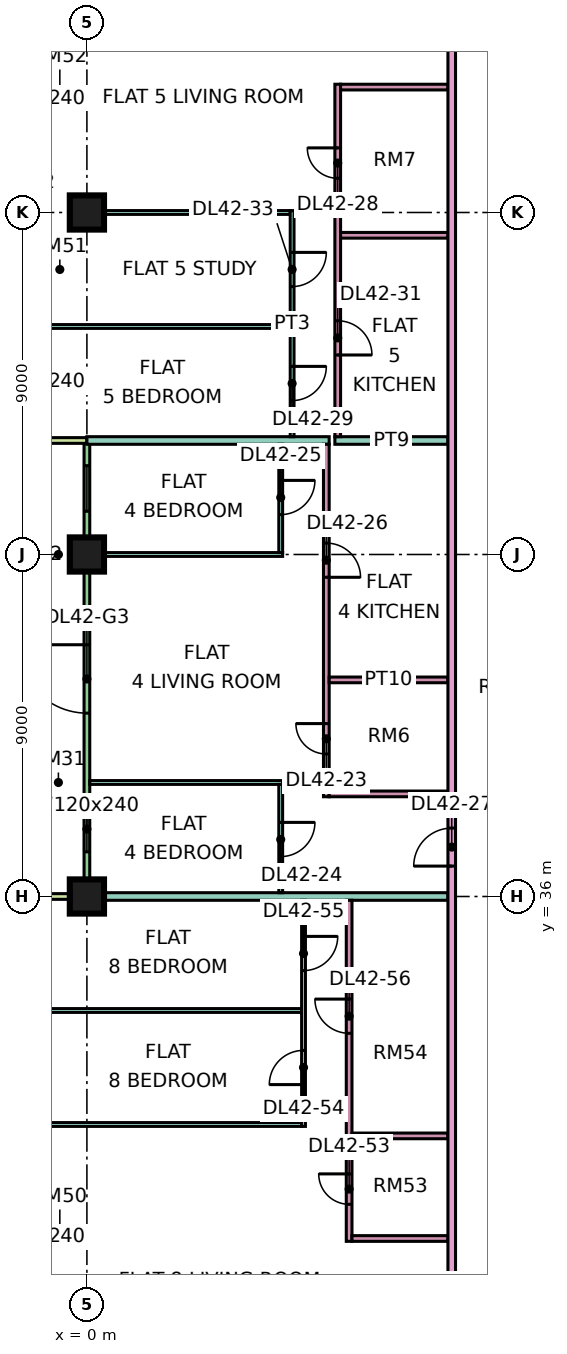
"""IFC4 building model, lengths in metres.
Left out: names, types, materials, properties, quantities, classifications, styles, units other than length and angle.
Written with IfcOpenShell. Run it as: python <this file> out.ifc"""

import sys

from ifc_helpers import new_model, si_unit, direction, frame, frame_2d, origin, origin_2d, place, context, subcontext, project, spatial, rectangle, extrude, element, fill, save


model = new_model("IFC4")
c1 = context("Model", 3, precision=1e-05, world=origin(), true_north=direction((0.0, 1.0)))
c2 = subcontext(c1, "Body", "Model", "MODEL_VIEW")
j1 = project(units=[si_unit("LENGTHUNIT", "METRE"), si_unit("PLANEANGLEUNIT", "RADIAN")], contexts=[c1])
p1 = place(None, origin())
s1 = spatial("IfcSite", under=j1, at=p1, CompositionType="ELEMENT")
p2 = place(p1, origin())
s2 = spatial("IfcBuilding", under=s1, at=p2, CompositionType="ELEMENT")
p3 = place(p2, frame((0.0, 0.0, 183.65)))
s3 = spatial("IfcBuildingStorey", under=s2, at=p3, CompositionType="ELEMENT", Elevation=183.65)
p4 = place(p3, frame((0.0, 36.0, 0.0), z_axis=(0.0, 0.0, 1.0), x_axis=(1.0, 0.0, 0.0)))
e1 = element("IfcColumn", 1, at=p4, inside=s3, PredefinedType="COLUMN", context=c2, shape_type="SweptSolid", body=[
    extrude(rectangle(XDim=0.9, YDim=0.9, at=origin_2d()), origin(), (0.0, 0.0, 1.0), 3.75),
])
p5 = place(p3, frame((0.0, 45.0, 0.0), z_axis=(0.0, 0.0, 1.0), x_axis=(1.0, 0.0, 0.0)))
e2 = element("IfcColumn", 2, at=p5, inside=s3, PredefinedType="COLUMN", context=c2, shape_type="SweptSolid", body=[
    extrude(rectangle(XDim=0.9, YDim=0.9, at=origin_2d()), origin(), (0.0, 0.0, 1.0), 3.75),
])
p6 = place(p3, frame((0.0, 54.0, 0.0), z_axis=(0.0, 0.0, 1.0), x_axis=(1.0, 0.0, 0.0)))
e3 = element("IfcColumn", 3, at=p6, inside=s3, PredefinedType="COLUMN", context=c2, shape_type="SweptSolid", body=[
    extrude(rectangle(XDim=0.9, YDim=0.9, at=origin_2d()), origin(), (0.0, 0.0, 1.0), 3.75),
])
p7 = place(p3, frame((0.0, 47.925, 0.0), z_axis=(0.0, 0.0, 1.0), x_axis=(0.0, -1.0, 0.0)))
e4 = element("IfcWall", 4, at=p7, inside=s3, PredefinedType="SOLIDWALL", context=c2, shape_type="SweptSolid", body=[
    extrude(rectangle(XDim=11.85, YDim=0.15, at=frame_2d((5.925, 0.0))), origin(), (0.0, 0.0, 1.0), 3.35),
])
p8 = place(p7, frame((0.587, 0.0, 0.45)))
e5 = element("IfcOpeningElement", 5, at=p8, cuts=e4, PredefinedType="OPENING", context=c2, shape_type="SweptSolid", body=[
    extrude(rectangle(XDim=1.2, YDim=2.4, at=frame_2d((0.6, 1.2))), frame((0.0, 0.085, 0.0), z_axis=(0.0, -1.0, 0.0), x_axis=(1.0, 0.0, 0.0)), (0.0, 0.0, 1.0), 0.17),
])
p9 = place(p7, frame((5.3, 0.0, 0.0)))
e6 = element("IfcOpeningElement", 6, at=p9, cuts=e4, PredefinedType="OPENING", context=c2, shape_type="SweptSolid", body=[
    extrude(rectangle(XDim=1.8, YDim=2.4, at=frame_2d((0.9, 1.2))), frame((0.0, 0.085, 0.0), z_axis=(0.0, -1.0, 0.0), x_axis=(1.0, 0.0, 0.0)), (0.0, 0.0, 1.0), 0.17),
])
p10 = place(p7, frame((9.55, 0.0, 0.45)))
e7 = element("IfcOpeningElement", 7, at=p10, cuts=e4, PredefinedType="OPENING", context=c2, shape_type="SweptSolid", body=[
    extrude(rectangle(XDim=1.2, YDim=2.4, at=frame_2d((0.6, 1.2))), frame((0.0, 0.085, 0.0), z_axis=(0.0, -1.0, 0.0), x_axis=(1.0, 0.0, 0.0)), (0.0, 0.0, 1.0), 0.17),
])
for number, where, z_axis, x_axis in (
    (8, (-1.5, 48.0, 0.0), (0.0, 0.0, 1.0), (1.0, 0.0, 0.0)),
    (9, (-1.5, 36.0, 0.0), (0.0, 0.0, 1.0), (1.0, 0.0, 0.0)),
):
    element("IfcWall", number, at=place(p3, frame(where, z_axis=z_axis, x_axis=x_axis)), inside=s3, PredefinedType="SOLIDWALL", context=c2, shape_type="SweptSolid", body=[
        extrude(rectangle(XDim=1.5, YDim=0.15, at=frame_2d((0.75, 0.0))), origin(), (0.0, 0.0, 1.0), 3.35),
    ])
p11 = place(p3, frame((-1.351, 33.0, 0.0), z_axis=(0.0, 0.0, 1.0), x_axis=(1.0, 0.0, 0.0)))
e10 = element("IfcWall", 10, at=p11, inside=s3, PredefinedType="PARTITIONING", context=c2, shape_type="SweptSolid", body=[
    extrude(rectangle(XDim=7.001, YDim=0.1, at=frame_2d((3.5, 0.0))), origin(), (0.0, 0.0, 1.0), 3.35),
])
p12 = place(p3, frame((-1.35, 30.0, 0.0), z_axis=(0.0, 0.0, 1.0), x_axis=(1.0, 0.0, 0.0)))
e11 = element("IfcWall", 11, at=p12, inside=s3, PredefinedType="PARTITIONING", context=c2, shape_type="SweptSolid", body=[
    extrude(rectangle(XDim=7.0, YDim=0.1, at=frame_2d((3.5, 0.0))), origin(), (0.0, 0.0, 1.0), 3.35),
])
e12 = element("IfcWall", 12, at=p4, inside=s3, PredefinedType="PARTITIONING", context=c2, shape_type="SweptSolid", body=[
    extrude(rectangle(XDim=9.5, YDim=0.2, at=frame_2d((4.75, 0.0))), origin(), (0.0, 0.0, 1.0), 3.35),
])
p13 = place(p3, frame((0.0, 48.0, 0.0), z_axis=(0.0, 0.0, 1.0), x_axis=(1.0, 0.0, 0.0)))
e13 = element("IfcWall", 13, at=p13, inside=s3, PredefinedType="PARTITIONING", context=c2, shape_type="SweptSolid", body=[
    extrude(rectangle(XDim=6.375, YDim=0.2, at=frame_2d((3.188, 0.0))), origin(), (0.0, 0.0, 1.0), 3.35),
])
p14 = place(p3, frame((-1.35, 51.0, 0.0), z_axis=(0.0, 0.0, 1.0), x_axis=(1.0, 0.0, 0.0)))
e14 = element("IfcWall", 14, at=p14, inside=s3, PredefinedType="PARTITIONING", context=c2, shape_type="SweptSolid", body=[
    extrude(rectangle(XDim=6.7, YDim=0.1, at=frame_2d((3.35, 0.0))), origin(), (0.0, 0.0, 1.0), 3.35),
])
e15 = element("IfcWall", 15, at=p6, inside=s3, PredefinedType="PARTITIONING", context=c2, shape_type="SweptSolid", body=[
    extrude(rectangle(XDim=5.35, YDim=0.1, at=frame_2d((2.675, 0.0))), origin(), (0.0, 0.0, 1.0), 3.35),
])
for number, where, z_axis, x_axis in (
    (16, (0.074, 39.0, 0.0), (0.0, 0.0, 1.0), (1.0, 0.0, 0.0)),
    (17, (0.074, 45.0, 0.0), (0.0, 0.0, 1.0), (1.0, 0.0, 0.0)),
):
    element("IfcWall", number, at=place(p3, frame(where, z_axis=z_axis, x_axis=x_axis)), inside=s3, PredefinedType="PARTITIONING", context=c2, shape_type="SweptSolid", body=[
        extrude(rectangle(XDim=5.076, YDim=0.1, at=frame_2d((2.538, 0.0))), origin(), (0.0, 0.0, 1.0), 3.35),
    ])
p15 = place(p3, frame((5.1, 36.1, 0.0), z_axis=(0.0, 0.0, 1.0), x_axis=(0.0, 1.0, 0.0)))
e18 = element("IfcWall", 18, at=p15, inside=s3, PredefinedType="PARTITIONING", context=c2, shape_type="SweptSolid", body=[
    extrude(rectangle(XDim=2.85, YDim=0.1, at=frame_2d((1.425, 0.0))), origin(), (0.0, 0.0, 1.0), 3.35),
])
p16 = place(p15, frame((0.95, 0.0, 0.0)))
e19 = element("IfcOpeningElement", 19, at=p16, cuts=e18, PredefinedType="OPENING", context=c2, shape_type="SweptSolid", body=[
    extrude(rectangle(XDim=0.9, YDim=2.1, at=frame_2d((0.45, 1.05))), frame((0.0, 0.06, 0.0), z_axis=(0.0, -1.0, 0.0), x_axis=(1.0, 0.0, 0.0)), (0.0, 0.0, 1.0), 0.12),
])
p17 = place(p3, frame((5.1, 45.05, 0.0), z_axis=(0.0, 0.0, 1.0), x_axis=(0.0, 1.0, 0.0)))
e20 = element("IfcWall", 20, at=p17, inside=s3, PredefinedType="PARTITIONING", context=c2, shape_type="SweptSolid", body=[
    extrude(rectangle(XDim=2.85, YDim=0.1, at=frame_2d((1.425, 0.0))), origin(), (0.0, 0.0, 1.0), 3.35),
])
p18 = place(p17, frame((1.0, 0.0, 0.0)))
e21 = element("IfcOpeningElement", 21, at=p18, cuts=e20, PredefinedType="OPENING", context=c2, shape_type="SweptSolid", body=[
    extrude(rectangle(XDim=0.9, YDim=2.1, at=frame_2d((0.45, 1.05))), frame((0.0, 0.06, 0.0), z_axis=(0.0, -1.0, 0.0), x_axis=(1.0, 0.0, 0.0)), (0.0, 0.0, 1.0), 0.12),
])
p19 = place(p3, frame((5.4, 48.1, 0.0), z_axis=(0.0, 0.0, 1.0), x_axis=(0.0, 1.0, 0.0)))
e22 = element("IfcWall", 22, at=p19, inside=s3, PredefinedType="PARTITIONING", context=c2, shape_type="SweptSolid", body=[
    extrude(rectangle(XDim=5.95, YDim=0.1, at=frame_2d((2.975, 0.0))), origin(), (0.0, 0.0, 1.0), 3.35),
])
p20 = place(p19, frame((0.95, 0.0, 0.0)))
e23 = element("IfcOpeningElement", 23, at=p20, cuts=e22, PredefinedType="OPENING", context=c2, shape_type="SweptSolid", body=[
    extrude(rectangle(XDim=0.9, YDim=2.1, at=frame_2d((0.45, 1.05))), frame((0.0, 0.06, 0.0), z_axis=(0.0, -1.0, 0.0), x_axis=(1.0, 0.0, 0.0)), (0.0, 0.0, 1.0), 0.12),
])
p21 = place(p19, frame((3.95, 0.0, 0.0)))
e24 = element("IfcOpeningElement", 24, at=p21, cuts=e22, PredefinedType="OPENING", context=c2, shape_type="SweptSolid", body=[
    extrude(rectangle(XDim=0.9, YDim=2.1, at=frame_2d((0.45, 1.05))), frame((0.0, 0.06, 0.0), z_axis=(0.0, -1.0, 0.0), x_axis=(1.0, 0.0, 0.0)), (0.0, 0.0, 1.0), 0.12),
])
p22 = place(p3, frame((5.7, 29.95, 0.0), z_axis=(0.0, 0.0, 1.0), x_axis=(0.0, 1.0, 0.0)))
e25 = element("IfcWall", 25, at=p22, inside=s3, PredefinedType="PARTITIONING", context=c2, shape_type="SweptSolid", body=[
    extrude(rectangle(XDim=5.95, YDim=0.1, at=frame_2d((2.975, 0.0))), origin(), (0.0, 0.0, 1.0), 3.35),
])
p23 = place(p22, frame((1.1, 0.0, 0.0)))
e26 = element("IfcOpeningElement", 26, at=p23, cuts=e25, PredefinedType="OPENING", context=c2, shape_type="SweptSolid", body=[
    extrude(rectangle(XDim=0.9, YDim=2.1, at=frame_2d((0.45, 1.05))), frame((0.0, 0.06, 0.0), z_axis=(0.0, -1.0, 0.0), x_axis=(1.0, 0.0, 0.0)), (0.0, 0.0, 1.0), 0.12),
])
p24 = place(p22, frame((4.1, 0.0, 0.0)))
e27 = element("IfcOpeningElement", 27, at=p24, cuts=e25, PredefinedType="OPENING", context=c2, shape_type="SweptSolid", body=[
    extrude(rectangle(XDim=0.9, YDim=2.1, at=frame_2d((0.45, 1.05))), frame((0.0, 0.06, 0.0), z_axis=(0.0, -1.0, 0.0), x_axis=(1.0, 0.0, 0.0)), (0.0, 0.0, 1.0), 0.12),
])
p25 = place(p3, frame((6.3, 38.625, 0.0), z_axis=(0.0, 0.0, 1.0), x_axis=(0.0, 1.0, 0.0)))
e28 = element("IfcWall", 28, at=p25, inside=s3, PredefinedType="PARTITIONING", context=c2, shape_type="SweptSolid", body=[
    extrude(rectangle(XDim=9.275, YDim=0.15, at=frame_2d((4.637, 0.0))), origin(), (0.0, 0.0, 1.0), 3.35),
])
p26 = place(p25, frame((1.125, 0.0, 0.0)))
e29 = element("IfcOpeningElement", 29, at=p26, cuts=e28, PredefinedType="OPENING", context=c2, shape_type="SweptSolid", body=[
    extrude(rectangle(XDim=0.8, YDim=2.1, at=frame_2d((0.4, 1.05))), frame((0.0, 0.085, 0.0), z_axis=(0.0, -1.0, 0.0), x_axis=(1.0, 0.0, 0.0)), (0.0, 0.0, 1.0), 0.17),
])
p27 = place(p25, frame((5.775, 0.0, 0.0)))
e30 = element("IfcOpeningElement", 30, at=p27, cuts=e28, PredefinedType="OPENING", context=c2, shape_type="SweptSolid", body=[
    extrude(rectangle(XDim=0.9, YDim=2.1, at=frame_2d((0.45, 1.05))), frame((0.0, 0.085, 0.0), z_axis=(0.0, -1.0, 0.0), x_axis=(1.0, 0.0, 0.0)), (0.0, 0.0, 1.0), 0.17),
])
for number, where, z_axis, x_axis in (
    (31, (6.375, 38.7, 0.0), (0.0, 0.0, 1.0), (1.0, 0.0, 0.0)),
    (32, (6.375, 41.7, 0.0), (0.0, 0.0, 1.0), (1.0, 0.0, 0.0)),
):
    element("IfcWall", number, at=place(p3, frame(where, z_axis=z_axis, x_axis=x_axis)), inside=s3, PredefinedType="PARTITIONING", context=c2, shape_type="SweptSolid", body=[
        extrude(rectangle(XDim=3.125, YDim=0.15, at=frame_2d((1.562, 0.0))), origin(), (0.0, 0.0, 1.0), 3.35),
    ])
p28 = place(p3, frame((6.525, 48.0, 0.0), z_axis=(0.0, 0.0, 1.0), x_axis=(1.0, 0.0, 0.0)))
e33 = element("IfcWall", 33, at=p28, inside=s3, PredefinedType="PARTITIONING", context=c2, shape_type="SweptSolid", body=[
    extrude(rectangle(XDim=2.975, YDim=0.2, at=frame_2d((1.488, 0.0))), origin(), (0.0, 0.0, 1.0), 3.35),
])
p29 = place(p3, frame((6.6, 48.1, 0.0), z_axis=(0.0, 0.0, 1.0), x_axis=(0.0, 1.0, 0.0)))
e34 = element("IfcWall", 34, at=p29, inside=s3, PredefinedType="PARTITIONING", context=c2, shape_type="SweptSolid", body=[
    extrude(rectangle(XDim=9.275, YDim=0.15, at=frame_2d((4.637, 0.0))), origin(), (0.0, 0.0, 1.0), 3.35),
])
p30 = place(p29, frame((6.8, 0.0, 0.0)))
e35 = element("IfcOpeningElement", 35, at=p30, cuts=e34, PredefinedType="OPENING", context=c2, shape_type="SweptSolid", body=[
    extrude(rectangle(XDim=0.8, YDim=2.1, at=frame_2d((0.4, 1.05))), frame((0.0, 0.085, 0.0), z_axis=(0.0, -1.0, 0.0), x_axis=(1.0, 0.0, 0.0)), (0.0, 0.0, 1.0), 0.17),
])
p31 = place(p29, frame((2.15, 0.0, 0.0)))
e36 = element("IfcOpeningElement", 36, at=p31, cuts=e34, PredefinedType="OPENING", context=c2, shape_type="SweptSolid", body=[
    extrude(rectangle(XDim=0.9, YDim=2.1, at=frame_2d((0.45, 1.05))), frame((0.0, 0.085, 0.0), z_axis=(0.0, -1.0, 0.0), x_axis=(1.0, 0.0, 0.0)), (0.0, 0.0, 1.0), 0.17),
])
for number, where, z_axis, x_axis in (
    (37, (6.675, 53.4, 0.0), (0.0, 0.0, 1.0), (1.0, 0.0, 0.0)),
    (38, (6.675, 57.3, 0.0), (0.0, 0.0, 1.0), (1.0, 0.0, 0.0)),
):
    element("IfcWall", number, at=place(p3, frame(where, z_axis=z_axis, x_axis=x_axis)), inside=s3, PredefinedType="PARTITIONING", context=c2, shape_type="SweptSolid", body=[
        extrude(rectangle(XDim=2.825, YDim=0.15, at=frame_2d((1.413, 0.0))), origin(), (0.0, 0.0, 1.0), 3.35),
    ])
p32 = place(p3, frame((6.9, 26.925, 0.0), z_axis=(0.0, 0.0, 1.0), x_axis=(0.0, 1.0, 0.0)))
e39 = element("IfcWall", 39, at=p32, inside=s3, PredefinedType="PARTITIONING", context=c2, shape_type="SweptSolid", body=[
    extrude(rectangle(XDim=8.975, YDim=0.15, at=frame_2d((4.487, 0.0))), origin(), (0.0, 0.0, 1.0), 3.35),
])
p33 = place(p32, frame((0.975, 0.0, 0.0)))
e40 = element("IfcOpeningElement", 40, at=p33, cuts=e39, PredefinedType="OPENING", context=c2, shape_type="SweptSolid", body=[
    extrude(rectangle(XDim=0.8, YDim=2.1, at=frame_2d((0.4, 1.05))), frame((0.0, 0.085, 0.0), z_axis=(0.0, -1.0, 0.0), x_axis=(1.0, 0.0, 0.0)), (0.0, 0.0, 1.0), 0.17),
])
p34 = place(p32, frame((5.475, 0.0, 0.0)))
e41 = element("IfcOpeningElement", 41, at=p34, cuts=e39, PredefinedType="OPENING", context=c2, shape_type="SweptSolid", body=[
    extrude(rectangle(XDim=0.9, YDim=2.1, at=frame_2d((0.45, 1.05))), frame((0.0, 0.085, 0.0), z_axis=(0.0, -1.0, 0.0), x_axis=(1.0, 0.0, 0.0)), (0.0, 0.0, 1.0), 0.17),
])
for number, where, z_axis, x_axis in (
    (42, (6.975, 27.0, 0.0), (0.0, 0.0, 1.0), (1.0, 0.0, 0.0)),
    (43, (6.975, 29.7, 0.0), (0.0, 0.0, 1.0), (1.0, 0.0, 0.0)),
):
    element("IfcWall", number, at=place(p3, frame(where, z_axis=z_axis, x_axis=x_axis)), inside=s3, PredefinedType="PARTITIONING", context=c2, shape_type="SweptSolid", body=[
        extrude(rectangle(XDim=2.525, YDim=0.15, at=frame_2d((1.262, 0.0))), origin(), (0.0, 0.0, 1.0), 3.35),
    ])
p35 = place(p3, frame((9.6, 20.0, 0.0), z_axis=(0.0, 0.0, 1.0), x_axis=(0.0, 1.0, 0.0)))
e44 = element("IfcWall", 44, at=p35, inside=s3, PredefinedType="PARTITIONING", context=c2, shape_type="SweptSolid", body=[
    extrude(rectangle(XDim=44.35, YDim=0.2, at=frame_2d((22.175, 0.0))), origin(), (0.0, 0.0, 1.0), 3.35),
])
p36 = place(p35, frame((16.8, 0.0, 0.0)))
e45 = element("IfcOpeningElement", 45, at=p36, cuts=e44, PredefinedType="OPENING", context=c2, shape_type="SweptSolid", body=[
    extrude(rectangle(XDim=1.0, YDim=2.1, at=frame_2d((0.5, 1.05))), frame((0.0, 0.11, 0.0), z_axis=(0.0, -1.0, 0.0), x_axis=(1.0, 0.0, 0.0)), (0.0, 0.0, 1.0), 0.22),
])
p37 = place(p35, frame((40.65, 0.0, 0.0)))
e46 = element("IfcOpeningElement", 46, at=p37, cuts=e44, PredefinedType="OPENING", context=c2, shape_type="SweptSolid", body=[
    extrude(rectangle(XDim=1.0, YDim=2.1, at=frame_2d((0.5, 1.05))), frame((0.0, 0.11, 0.0), z_axis=(0.0, -1.0, 0.0), x_axis=(1.0, 0.0, 0.0)), (0.0, 0.0, 1.0), 0.22),
])
p38 = place(p35, frame((0.6, 0.0, 0.0)))
e47 = element("IfcOpeningElement", 47, at=p38, cuts=e44, PredefinedType="OPENING", context=c2, shape_type="SweptSolid", body=[
    extrude(rectangle(XDim=1.2, YDim=2.1, at=frame_2d((0.6, 1.05))), frame((0.0, 0.11, 0.0), z_axis=(0.0, -1.0, 0.0), x_axis=(1.0, 0.0, 0.0)), (0.0, 0.0, 1.0), 0.22),
])
p39 = place(p35, frame((4.2, 0.0, 0.0)))
e48 = element("IfcOpeningElement", 48, at=p39, cuts=e44, PredefinedType="OPENING", context=c2, shape_type="SweptSolid", body=[
    extrude(rectangle(XDim=1.0, YDim=2.1, at=frame_2d((0.5, 1.05))), frame((0.0, 0.11, 0.0), z_axis=(0.0, -1.0, 0.0), x_axis=(1.0, 0.0, 0.0)), (0.0, 0.0, 1.0), 0.22),
])
p40 = place(p8, origin())
e49 = element("IfcWindow", 49, at=p40, inside=s3, PartitioningType="SINGLE_PANEL", PredefinedType="WINDOW", context=c2, shape_type="SweptSolid", body=[
    extrude(rectangle(XDim=1.2, YDim=2.4, at=frame_2d((0.6, 1.2))), frame((0.0, 0.03, 0.0), z_axis=(0.0, -1.0, 0.0), x_axis=(1.0, 0.0, 0.0)), (0.0, 0.0, 1.0), 0.06),
])
fill(e5, e49)
p41 = place(p9, frame((1.8, 0.0, 0.0), z_axis=(0.0, 0.0, 1.0), x_axis=(-1.0, 0.0, 0.0)))
e50 = element("IfcDoor", 50, at=p41, inside=s3, OperationType="DOUBLE_DOOR_SINGLE_SWING", PredefinedType="DOOR", context=c2, shape_type="SweptSolid", body=[
    extrude(rectangle(XDim=1.8, YDim=2.4, at=frame_2d((0.9, 1.2))), frame((0.0, 0.025, 0.0), z_axis=(0.0, -1.0, 0.0), x_axis=(1.0, 0.0, 0.0)), (0.0, 0.0, 1.0), 0.05),
])
fill(e6, e50)
p42 = place(p10, origin())
e51 = element("IfcWindow", 51, at=p42, inside=s3, PartitioningType="SINGLE_PANEL", PredefinedType="WINDOW", context=c2, shape_type="SweptSolid", body=[
    extrude(rectangle(XDim=1.2, YDim=2.4, at=frame_2d((0.6, 1.2))), frame((0.0, 0.03, 0.0), z_axis=(0.0, -1.0, 0.0), x_axis=(1.0, 0.0, 0.0)), (0.0, 0.0, 1.0), 0.06),
])
fill(e7, e51)
p43 = place(p26, frame((0.8, 0.0, 0.0), z_axis=(0.0, 0.0, 1.0), x_axis=(-1.0, 0.0, 0.0)))
e52 = element("IfcDoor", 52, at=p43, inside=s3, OperationType="SINGLE_SWING_RIGHT", PredefinedType="DOOR", context=c2, shape_type="SweptSolid", body=[
    extrude(rectangle(XDim=0.8, YDim=2.1, at=frame_2d((0.4, 1.05))), frame((0.0, 0.025, 0.0), z_axis=(0.0, -1.0, 0.0), x_axis=(1.0, 0.0, 0.0)), (0.0, 0.0, 1.0), 0.05),
])
fill(e29, e52)
p44 = place(p16, origin())
e53 = element("IfcDoor", 53, at=p44, inside=s3, OperationType="SINGLE_SWING_RIGHT", PredefinedType="DOOR", context=c2, shape_type="SweptSolid", body=[
    extrude(rectangle(XDim=0.9, YDim=2.1, at=frame_2d((0.45, 1.05))), frame((0.0, 0.025, 0.0), z_axis=(0.0, -1.0, 0.0), x_axis=(1.0, 0.0, 0.0)), (0.0, 0.0, 1.0), 0.05),
])
fill(e19, e53)
p45 = place(p18, origin())
e54 = element("IfcDoor", 54, at=p45, inside=s3, OperationType="SINGLE_SWING_RIGHT", PredefinedType="DOOR", context=c2, shape_type="SweptSolid", body=[
    extrude(rectangle(XDim=0.9, YDim=2.1, at=frame_2d((0.45, 1.05))), frame((0.0, 0.025, 0.0), z_axis=(0.0, -1.0, 0.0), x_axis=(1.0, 0.0, 0.0)), (0.0, 0.0, 1.0), 0.05),
])
fill(e21, e54)
p46 = place(p27, frame((0.9, 0.0, 0.0), z_axis=(0.0, 0.0, 1.0), x_axis=(-1.0, 0.0, 0.0)))
e55 = element("IfcDoor", 55, at=p46, inside=s3, OperationType="SINGLE_SWING_LEFT", PredefinedType="DOOR", context=c2, shape_type="SweptSolid", body=[
    extrude(rectangle(XDim=0.9, YDim=2.1, at=frame_2d((0.45, 1.05))), frame((0.0, 0.025, 0.0), z_axis=(0.0, -1.0, 0.0), x_axis=(1.0, 0.0, 0.0)), (0.0, 0.0, 1.0), 0.05),
])
fill(e30, e55)
p47 = place(p36, origin())
e56 = element("IfcDoor", 56, at=p47, inside=s3, OperationType="SINGLE_SWING_LEFT", PredefinedType="DOOR", context=c2, shape_type="SweptSolid", body=[
    extrude(rectangle(XDim=1.0, YDim=2.1, at=frame_2d((0.5, 1.05))), frame((0.0, 0.025, 0.0), z_axis=(0.0, -1.0, 0.0), x_axis=(1.0, 0.0, 0.0)), (0.0, 0.0, 1.0), 0.05),
])
fill(e45, e56)
p48 = place(p30, frame((0.8, 0.0, 0.0), z_axis=(0.0, 0.0, 1.0), x_axis=(-1.0, 0.0, 0.0)))
e57 = element("IfcDoor", 57, at=p48, inside=s3, OperationType="SINGLE_SWING_RIGHT", PredefinedType="DOOR", context=c2, shape_type="SweptSolid", body=[
    extrude(rectangle(XDim=0.8, YDim=2.1, at=frame_2d((0.4, 1.05))), frame((0.0, 0.025, 0.0), z_axis=(0.0, -1.0, 0.0), x_axis=(1.0, 0.0, 0.0)), (0.0, 0.0, 1.0), 0.05),
])
fill(e35, e57)
p49 = place(p20, origin())
e58 = element("IfcDoor", 58, at=p49, inside=s3, OperationType="SINGLE_SWING_RIGHT", PredefinedType="DOOR", context=c2, shape_type="SweptSolid", body=[
    extrude(rectangle(XDim=0.9, YDim=2.1, at=frame_2d((0.45, 1.05))), frame((0.0, 0.025, 0.0), z_axis=(0.0, -1.0, 0.0), x_axis=(1.0, 0.0, 0.0)), (0.0, 0.0, 1.0), 0.05),
])
fill(e23, e58)
p50 = place(p31, frame((0.9, 0.0, 0.0), z_axis=(0.0, 0.0, 1.0), x_axis=(-1.0, 0.0, 0.0)))
e59 = element("IfcDoor", 59, at=p50, inside=s3, OperationType="SINGLE_SWING_LEFT", PredefinedType="DOOR", context=c2, shape_type="SweptSolid", body=[
    extrude(rectangle(XDim=0.9, YDim=2.1, at=frame_2d((0.45, 1.05))), frame((0.0, 0.025, 0.0), z_axis=(0.0, -1.0, 0.0), x_axis=(1.0, 0.0, 0.0)), (0.0, 0.0, 1.0), 0.05),
])
fill(e36, e59)
p51 = place(p21, origin())
e60 = element("IfcDoor", 60, at=p51, inside=s3, OperationType="SINGLE_SWING_RIGHT", PredefinedType="DOOR", context=c2, shape_type="SweptSolid", body=[
    extrude(rectangle(XDim=0.9, YDim=2.1, at=frame_2d((0.45, 1.05))), frame((0.0, 0.025, 0.0), z_axis=(0.0, -1.0, 0.0), x_axis=(1.0, 0.0, 0.0)), (0.0, 0.0, 1.0), 0.05),
])
fill(e24, e60)
p52 = place(p33, frame((0.8, 0.0, 0.0), z_axis=(0.0, 0.0, 1.0), x_axis=(-1.0, 0.0, 0.0)))
e61 = element("IfcDoor", 61, at=p52, inside=s3, OperationType="SINGLE_SWING_RIGHT", PredefinedType="DOOR", context=c2, shape_type="SweptSolid", body=[
    extrude(rectangle(XDim=0.8, YDim=2.1, at=frame_2d((0.4, 1.05))), frame((0.0, 0.025, 0.0), z_axis=(0.0, -1.0, 0.0), x_axis=(1.0, 0.0, 0.0)), (0.0, 0.0, 1.0), 0.05),
])
fill(e40, e61)
p53 = place(p23, origin())
e62 = element("IfcDoor", 62, at=p53, inside=s3, OperationType="SINGLE_SWING_LEFT", PredefinedType="DOOR", context=c2, shape_type="SweptSolid", body=[
    extrude(rectangle(XDim=0.9, YDim=2.1, at=frame_2d((0.45, 1.05))), frame((0.0, 0.025, 0.0), z_axis=(0.0, -1.0, 0.0), x_axis=(1.0, 0.0, 0.0)), (0.0, 0.0, 1.0), 0.05),
])
fill(e26, e62)
p54 = place(p24, origin())
e63 = element("IfcDoor", 63, at=p54, inside=s3, OperationType="SINGLE_SWING_RIGHT", PredefinedType="DOOR", context=c2, shape_type="SweptSolid", body=[
    extrude(rectangle(XDim=0.9, YDim=2.1, at=frame_2d((0.45, 1.05))), frame((0.0, 0.025, 0.0), z_axis=(0.0, -1.0, 0.0), x_axis=(1.0, 0.0, 0.0)), (0.0, 0.0, 1.0), 0.05),
])
fill(e27, e63)
p55 = place(p34, frame((0.9, 0.0, 0.0), z_axis=(0.0, 0.0, 1.0), x_axis=(-1.0, 0.0, 0.0)))
e64 = element("IfcDoor", 64, at=p55, inside=s3, OperationType="SINGLE_SWING_RIGHT", PredefinedType="DOOR", context=c2, shape_type="SweptSolid", body=[
    extrude(rectangle(XDim=0.9, YDim=2.1, at=frame_2d((0.45, 1.05))), frame((0.0, 0.025, 0.0), z_axis=(0.0, -1.0, 0.0), x_axis=(1.0, 0.0, 0.0)), (0.0, 0.0, 1.0), 0.05),
])
fill(e41, e64)
save(model, sys.argv[1])
